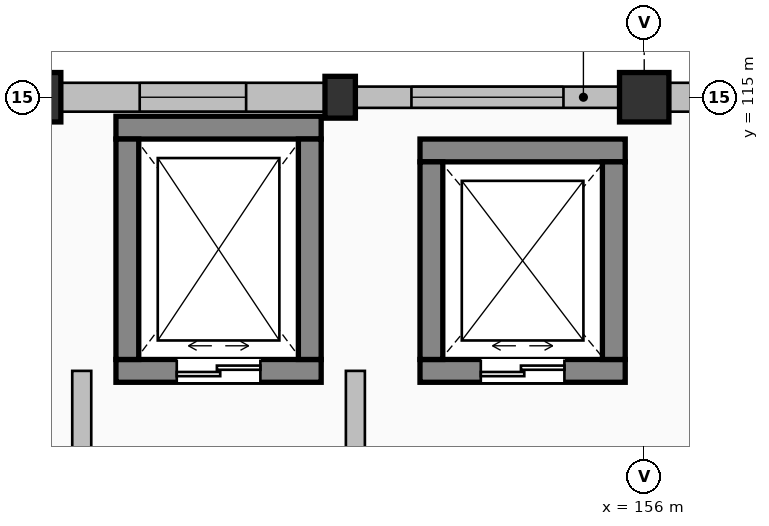
"""IFC4 building model, lengths in metres.
Left out: names, types, materials, properties, quantities, classifications, styles, units other than length and angle.
Written with IfcOpenShell. Run it as: python <this file> out.ifc"""

import sys

from ifc_helpers import new_model, si_unit, direction, frame, frame_2d, origin, origin_2d, place, context, subcontext, project, spatial, rectangle, extrude, element, fill, save


model = new_model("IFC4")
c1 = context("Model", 3, precision=1e-05, world=origin(), true_north=direction((0.0, 1.0)))
c2 = subcontext(c1, "Body", "Model", "MODEL_VIEW")
j1 = project(units=[si_unit("LENGTHUNIT", "METRE"), si_unit("PLANEANGLEUNIT", "RADIAN")], contexts=[c1])
p1 = place(None, origin())
s1 = spatial("IfcSite", under=j1, at=p1, CompositionType="ELEMENT")
p2 = place(p1, origin())
s2 = spatial("IfcBuilding", under=s1, at=p2, CompositionType="ELEMENT")
p3 = place(p2, frame((0.0, 0.0, 13.8)))
s3 = spatial("IfcBuildingStorey", under=s2, at=p3, CompositionType="ELEMENT", Elevation=13.8)
p4 = place(p3, frame((148.0, 115.0, 0.0), z_axis=(0.0, 0.0, 1.0), x_axis=(1.0, 0.0, 0.0)))
e1 = element("IfcColumn", 1, at=p4, inside=s3, PredefinedType="COLUMN", context=c2, shape_type="SweptSolid", body=[
    extrude(rectangle(XDim=0.65, YDim=0.65, at=origin_2d()), origin(), (0.0, 0.0, 1.0), 4.5),
])
p5 = place(p3, frame((152.0, 115.0, 0.0), z_axis=(0.0, 0.0, 1.0), x_axis=(1.0, 0.0, 0.0)))
e2 = element("IfcColumn", 2, at=p5, inside=s3, PredefinedType="PILASTER", context=c2, shape_type="SweptSolid", body=[
    extrude(rectangle(XDim=0.4, YDim=0.55, at=origin_2d()), origin(), (0.0, 0.0, 1.0), 4.5),
])
p6 = place(p3, frame((156.0, 115.0, 0.0), z_axis=(0.0, 0.0, 1.0), x_axis=(1.0, 0.0, 0.0)))
e3 = element("IfcColumn", 3, at=p6, inside=s3, PredefinedType="COLUMN", context=c2, shape_type="SweptSolid", body=[
    extrude(rectangle(XDim=0.65, YDim=0.65, at=origin_2d()), origin(), (0.0, 0.0, 1.0), 4.5),
])
p7 = place(p3, frame((148.325, 115.0, 0.0), z_axis=(0.0, 0.0, 1.0), x_axis=(1.0, 0.0, 0.0)))
e4 = element("IfcWall", 4, at=p7, inside=s3, PredefinedType="SOLIDWALL", context=c2, shape_type="SweptSolid", body=[
    extrude(rectangle(XDim=3.475, YDim=0.38, at=frame_2d((1.738, 0.0))), origin(), (0.0, 0.0, 1.0), 3.955),
])
p8 = place(p7, frame((1.038, 0.0, 0.95)))
e5 = element("IfcOpeningElement", 5, at=p8, cuts=e4, PredefinedType="OPENING", context=c2, shape_type="SweptSolid", body=[
    extrude(rectangle(XDim=1.4, YDim=1.8, at=frame_2d((0.7, 0.9))), frame((0.0, 0.2, 0.0), z_axis=(0.0, -1.0, 0.0), x_axis=(1.0, 0.0, 0.0)), (0.0, 0.0, 1.0), 0.4),
])
p9 = place(p3, frame((152.2, 115.0, 0.0), z_axis=(0.0, 0.0, 1.0), x_axis=(1.0, 0.0, 0.0)))
e6 = element("IfcWall", 6, at=p9, inside=s3, PredefinedType="SOLIDWALL", context=c2, shape_type="SweptSolid", body=[
    extrude(rectangle(XDim=3.475, YDim=0.28, at=frame_2d((1.738, 0.0))), origin(), (0.0, 0.0, 1.0), 3.955),
])
p10 = place(p9, frame((0.738, 0.0, 0.95)))
e7 = element("IfcOpeningElement", 7, at=p10, cuts=e6, PredefinedType="OPENING", context=c2, shape_type="SweptSolid", body=[
    extrude(rectangle(XDim=2.0, YDim=1.8, at=frame_2d((1.0, 0.9))), frame((0.0, 0.15, 0.0), z_axis=(0.0, -1.0, 0.0), x_axis=(1.0, 0.0, 0.0)), (0.0, 0.0, 1.0), 0.3),
])
p11 = place(p3, frame((156.325, 115.0, 0.0), z_axis=(0.0, 0.0, 1.0), x_axis=(1.0, 0.0, 0.0)))
e8 = element("IfcWall", 8, at=p11, inside=s3, PredefinedType="SOLIDWALL", context=c2, shape_type="SweptSolid", body=[
    extrude(rectangle(XDim=3.425, YDim=0.38, at=frame_2d((1.712, 0.0))), origin(), (0.0, 0.0, 1.0), 3.755),
])
p12 = place(p11, frame((1.113, 0.0, 0.95)))
e9 = element("IfcOpeningElement", 9, at=p12, cuts=e8, PredefinedType="OPENING", context=c2, shape_type="SweptSolid", body=[
    extrude(rectangle(XDim=1.2, YDim=1.5, at=frame_2d((0.6, 0.75))), frame((0.0, 0.2, 0.0), z_axis=(0.0, -1.0, 0.0), x_axis=(1.0, 0.0, 0.0)), (0.0, 0.0, 1.0), 0.4),
])
p13 = place(p3, frame((149.05, 111.4, 0.0), z_axis=(0.0, 0.0, 1.0), x_axis=(1.0, 0.0, 0.0)))
e10 = element("IfcWall", 10, at=p13, inside=s3, PredefinedType="SHEAR", context=c2, shape_type="SweptSolid", body=[
    extrude(rectangle(XDim=2.7, YDim=0.3, at=frame_2d((1.35, 0.0))), origin(), (0.0, 0.0, 1.0), 4.27),
])
p14 = place(p13, frame((0.8, 0.0, 0.0)))
e11 = element("IfcOpeningElement", 11, at=p14, cuts=e10, PredefinedType="OPENING", context=c2, shape_type="SweptSolid", body=[
    extrude(rectangle(XDim=1.1, YDim=2.15, at=frame_2d((0.55, 1.075))), frame((0.0, 0.16, 0.0), z_axis=(0.0, -1.0, 0.0), x_axis=(1.0, 0.0, 0.0)), (0.0, 0.0, 1.0), 0.32),
])
p15 = place(p3, frame((151.75, 114.6, 0.0), z_axis=(0.0, 0.0, 1.0), x_axis=(-1.0, 0.0, 0.0)))
e12 = element("IfcWall", 12, at=p15, inside=s3, PredefinedType="SHEAR", context=c2, shape_type="SweptSolid", body=[
    extrude(rectangle(XDim=2.7, YDim=0.3, at=frame_2d((1.35, 0.0))), origin(), (0.0, 0.0, 1.0), 4.27),
])
for number, where, z_axis, x_axis in (
    (13, (149.2, 111.55, 0.0), (0.0, 0.0, 1.0), (0.0, 1.0, 0.0)),
    (14, (151.6, 114.45, 0.0), (0.0, 0.0, 1.0), (0.0, -1.0, 0.0)),
):
    element("IfcWall", number, at=place(p3, frame(where, z_axis=z_axis, x_axis=x_axis)), inside=s3, PredefinedType="SHEAR", context=c2, shape_type="SweptSolid", body=[
        extrude(rectangle(XDim=2.9, YDim=0.3, at=frame_2d((1.45, 0.0))), origin(), (0.0, 0.0, 1.0), 4.27),
    ])
for number, where, z_axis, x_axis in (
    (15, (148.6, 107.8, 0.0), (0.0, 0.0, 1.0), (0.0, 1.0, 0.0)),
    (16, (152.2, 111.4, 0.0), (0.0, 0.0, 1.0), (0.0, -1.0, 0.0)),
):
    element("IfcWall", number, at=place(p3, frame(where, z_axis=z_axis, x_axis=x_axis)), inside=s3, PredefinedType="SOLIDWALL", context=c2, shape_type="SweptSolid", body=[
        extrude(rectangle(XDim=3.6, YDim=0.25, at=frame_2d((1.8, 0.0))), origin(), (0.0, 0.0, 1.0), 4.27),
    ])
p16 = place(p3, frame((153.05, 111.4, 0.0), z_axis=(0.0, 0.0, 1.0), x_axis=(1.0, 0.0, 0.0)))
e17 = element("IfcWall", 17, at=p16, inside=s3, PredefinedType="SHEAR", context=c2, shape_type="SweptSolid", body=[
    extrude(rectangle(XDim=2.7, YDim=0.3, at=frame_2d((1.35, 0.0))), origin(), (0.0, 0.0, 1.0), 4.27),
])
p17 = place(p16, frame((0.8, 0.0, 0.0)))
e18 = element("IfcOpeningElement", 18, at=p17, cuts=e17, PredefinedType="OPENING", context=c2, shape_type="SweptSolid", body=[
    extrude(rectangle(XDim=1.1, YDim=2.15, at=frame_2d((0.55, 1.075))), frame((0.0, 0.16, 0.0), z_axis=(0.0, -1.0, 0.0), x_axis=(1.0, 0.0, 0.0)), (0.0, 0.0, 1.0), 0.32),
])
p18 = place(p3, frame((155.75, 114.3, 0.0), z_axis=(0.0, 0.0, 1.0), x_axis=(-1.0, 0.0, 0.0)))
e19 = element("IfcWall", 19, at=p18, inside=s3, PredefinedType="SHEAR", context=c2, shape_type="SweptSolid", body=[
    extrude(rectangle(XDim=2.7, YDim=0.3, at=frame_2d((1.35, 0.0))), origin(), (0.0, 0.0, 1.0), 4.27),
])
for number, where, z_axis, x_axis in (
    (20, (153.2, 111.55, 0.0), (0.0, 0.0, 1.0), (0.0, 1.0, 0.0)),
    (21, (155.6, 114.15, 0.0), (0.0, 0.0, 1.0), (0.0, -1.0, 0.0)),
):
    element("IfcWall", number, at=place(p3, frame(where, z_axis=z_axis, x_axis=x_axis)), inside=s3, PredefinedType="SHEAR", context=c2, shape_type="SweptSolid", body=[
        extrude(rectangle(XDim=2.6, YDim=0.3, at=frame_2d((1.3, 0.0))), origin(), (0.0, 0.0, 1.0), 4.27),
    ])
p19 = place(p8, origin())
e22 = element("IfcWindow", 22, at=p19, inside=s3, PartitioningType="DOUBLE_PANEL_VERTICAL", PredefinedType="WINDOW", context=c2, shape_type="SweptSolid", body=[
    extrude(rectangle(XDim=1.4, YDim=1.8, at=frame_2d((0.7, 0.9))), frame((0.0, 0.03, 0.0), z_axis=(0.0, -1.0, 0.0), x_axis=(1.0, 0.0, 0.0)), (0.0, 0.0, 1.0), 0.06),
])
fill(e5, e22)
p20 = place(p10, origin())
e23 = element("IfcWindow", 23, at=p20, inside=s3, PartitioningType="TRIPLE_PANEL_VERTICAL", PredefinedType="WINDOW", context=c2, shape_type="SweptSolid", body=[
    extrude(rectangle(XDim=2.0, YDim=1.8, at=frame_2d((1.0, 0.9))), frame((0.0, 0.03, 0.0), z_axis=(0.0, -1.0, 0.0), x_axis=(1.0, 0.0, 0.0)), (0.0, 0.0, 1.0), 0.06),
])
fill(e7, e23)
p21 = place(p14, origin())
e24 = element("IfcDoor", 24, at=p21, inside=s3, OperationType="DOUBLE_DOOR_SLIDING", PredefinedType="DOOR", context=c2, shape_type="SweptSolid", body=[
    extrude(rectangle(XDim=1.1, YDim=2.15, at=frame_2d((0.55, 1.075))), frame((0.0, 0.025, 0.0), z_axis=(0.0, -1.0, 0.0), x_axis=(1.0, 0.0, 0.0)), (0.0, 0.0, 1.0), 0.05),
])
fill(e11, e24)
p22 = place(p17, origin())
e25 = element("IfcDoor", 25, at=p22, inside=s3, OperationType="DOUBLE_DOOR_SLIDING", PredefinedType="DOOR", context=c2, shape_type="SweptSolid", body=[
    extrude(rectangle(XDim=1.1, YDim=2.15, at=frame_2d((0.55, 1.075))), frame((0.0, 0.025, 0.0), z_axis=(0.0, -1.0, 0.0), x_axis=(1.0, 0.0, 0.0)), (0.0, 0.0, 1.0), 0.05),
])
fill(e18, e25)
save(model, sys.argv[1])
